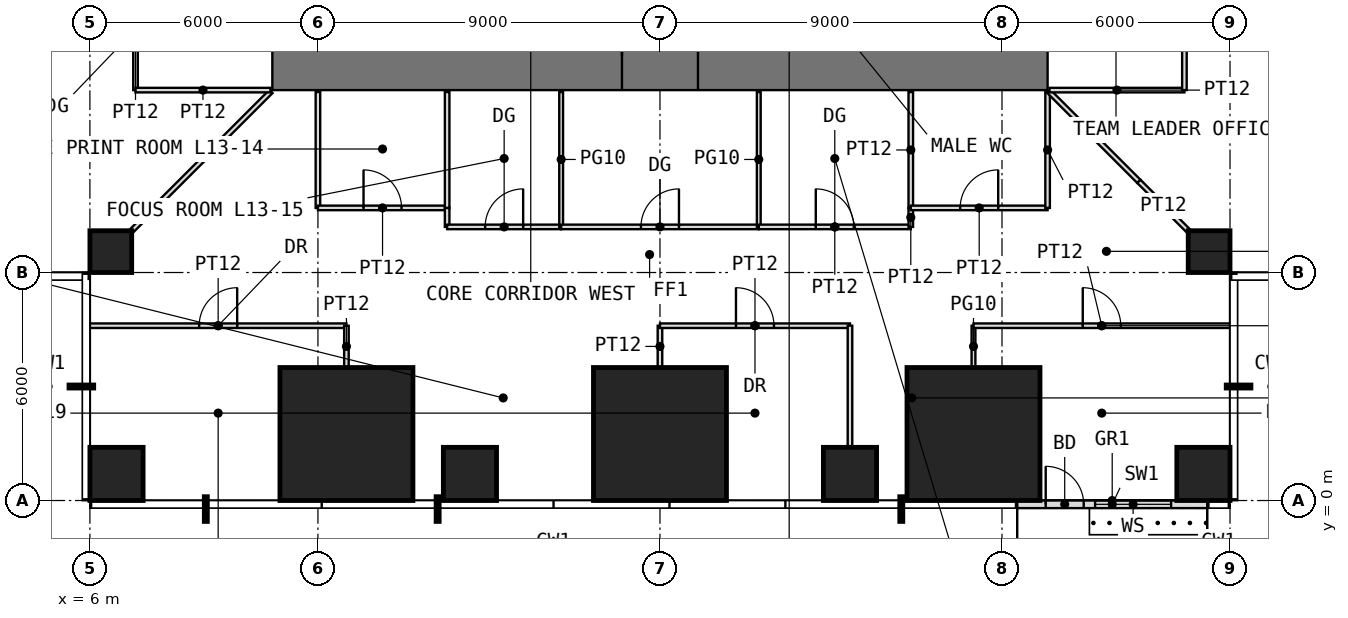
"""IFC4 building model, lengths in metres.
Left out: names, types, materials, properties, quantities, classifications, styles, units other than length and angle.
Written with IfcOpenShell. Run it as: python <this file> out.ifc"""

import sys

from ifc_helpers import new_model, si_unit, direction, frame, frame_2d, origin, origin_2d, place, context, subcontext, project, spatial, rectangle, extrude, element, fill, save


model = new_model("IFC4")
c1 = context("Model", 3, precision=1e-05, world=origin(), true_north=direction((0.0, 1.0)))
c2 = subcontext(c1, "Body", "Model", "MODEL_VIEW")
j1 = project(units=[si_unit("LENGTHUNIT", "METRE"), si_unit("PLANEANGLEUNIT", "RADIAN")], contexts=[c1])
p1 = place(None, origin())
s1 = spatial("IfcSite", under=j1, at=p1, CompositionType="ELEMENT")
p2 = place(p1, origin())
s2 = spatial("IfcBuilding", under=s1, at=p2, CompositionType="ELEMENT")
p3 = place(p2, frame((0.0, 0.0, 58.5)))
s3 = spatial("IfcBuildingStorey", under=s2, at=p3, CompositionType="ELEMENT", Elevation=58.5)
p4 = place(p3, frame((6.7, 0.7, 0.0), z_axis=(0.0, 0.0, 1.0), x_axis=(1.0, 0.0, 0.0)))
e1 = element("IfcColumn", 1, at=p4, inside=s3, PredefinedType="COLUMN", context=c2, shape_type="SweptSolid", body=[
    extrude(rectangle(XDim=1.4, YDim=1.4, at=origin_2d()), origin(), (0.0, 0.0, 1.0), 4.0),
])
p5 = place(p3, frame((12.75, 1.75, 0.0), z_axis=(0.0, 0.0, 1.0), x_axis=(1.0, 0.0, 0.0)))
e2 = element("IfcColumn", 2, at=p5, inside=s3, PredefinedType="COLUMN", context=c2, shape_type="SweptSolid", body=[
    extrude(rectangle(XDim=3.5, YDim=3.5, at=origin_2d()), origin(), (0.0, 0.0, 1.0), 4.0),
])
p6 = place(p3, frame((16.0, 0.7, 0.0), z_axis=(0.0, 0.0, 1.0), x_axis=(1.0, 0.0, 0.0)))
e3 = element("IfcColumn", 3, at=p6, inside=s3, PredefinedType="COLUMN", context=c2, shape_type="SweptSolid", body=[
    extrude(rectangle(XDim=1.4, YDim=1.4, at=origin_2d()), origin(), (0.0, 0.0, 1.0), 4.0),
])
p7 = place(p3, frame((21.0, 1.75, 0.0), z_axis=(0.0, 0.0, 1.0), x_axis=(1.0, 0.0, 0.0)))
e4 = element("IfcColumn", 4, at=p7, inside=s3, PredefinedType="COLUMN", context=c2, shape_type="SweptSolid", body=[
    extrude(rectangle(XDim=3.5, YDim=3.5, at=origin_2d()), origin(), (0.0, 0.0, 1.0), 4.0),
])
p8 = place(p3, frame((26.0, 0.7, 0.0), z_axis=(0.0, 0.0, 1.0), x_axis=(1.0, 0.0, 0.0)))
e5 = element("IfcColumn", 5, at=p8, inside=s3, PredefinedType="COLUMN", context=c2, shape_type="SweptSolid", body=[
    extrude(rectangle(XDim=1.4, YDim=1.4, at=origin_2d()), origin(), (0.0, 0.0, 1.0), 4.0),
])
p9 = place(p3, frame((29.25, 1.75, 0.0), z_axis=(0.0, 0.0, 1.0), x_axis=(1.0, 0.0, 0.0)))
e6 = element("IfcColumn", 6, at=p9, inside=s3, PredefinedType="COLUMN", context=c2, shape_type="SweptSolid", body=[
    extrude(rectangle(XDim=3.5, YDim=3.5, at=origin_2d()), origin(), (0.0, 0.0, 1.0), 4.0),
])
p10 = place(p3, frame((35.3, 0.7, 0.0), z_axis=(0.0, 0.0, 1.0), x_axis=(1.0, 0.0, 0.0)))
e7 = element("IfcColumn", 7, at=p10, inside=s3, PredefinedType="COLUMN", context=c2, shape_type="SweptSolid", body=[
    extrude(rectangle(XDim=1.4, YDim=1.4, at=origin_2d()), origin(), (0.0, 0.0, 1.0), 4.0),
])
for number, where, z_axis, x_axis in (
    (8, (6.55, 6.55, 0.0), (0.0, 0.0, 1.0), (1.0, 0.0, 0.0)),
    (9, (35.45, 6.55, 0.0), (0.0, 0.0, 1.0), (1.0, 0.0, 0.0)),
):
    element("IfcColumn", number, at=place(p3, frame(where, z_axis=z_axis, x_axis=x_axis)), inside=s3, PredefinedType="COLUMN", context=c2, shape_type="SweptSolid", body=[
        extrude(rectangle(XDim=1.1, YDim=1.1, at=origin_2d()), origin(), (0.0, 0.0, 1.0), 4.0),
    ])
p11 = place(p3, frame((30.4, -0.1, 0.0), z_axis=(0.0, 0.0, 1.0), x_axis=(1.0, 0.0, 0.0)))
e10 = element("IfcWall", 10, at=p11, inside=s3, PredefinedType="USERDEFINED", context=c2, shape_type="SweptSolid", body=[
    extrude(rectangle(XDim=5.0, YDim=0.2, at=frame_2d((2.5, 0.0))), origin(), (0.0, 0.0, 1.0), 3.75),
])
p12 = place(p11, frame((0.75, 0.0, 0.0)))
e11 = element("IfcOpeningElement", 11, at=p12, cuts=e10, PredefinedType="OPENING", context=c2, shape_type="SweptSolid", body=[
    extrude(rectangle(XDim=1.0, YDim=2.4, at=frame_2d((0.5, 1.2))), frame((0.0, 0.11, 0.0), z_axis=(0.0, -1.0, 0.0), x_axis=(1.0, 0.0, 0.0)), (0.0, 0.0, 1.0), 0.22),
])
p13 = place(p11, frame((2.05, 0.0, 0.3)))
e12 = element("IfcOpeningElement", 12, at=p13, cuts=e10, PredefinedType="OPENING", context=c2, shape_type="SweptSolid", body=[
    extrude(rectangle(XDim=2.0, YDim=2.7, at=frame_2d((1.0, 1.35))), frame((0.0, 0.11, 0.0), z_axis=(0.0, -1.0, 0.0), x_axis=(1.0, 0.0, 0.0)), (0.0, 0.0, 1.0), 0.22),
])
p14 = place(p3, frame((10.8, 11.7, -0.05), z_axis=(0.0, 0.0, 1.0), x_axis=(1.0, 0.0, 0.0)))
e13 = element("IfcWall", 13, at=p14, inside=s3, PredefinedType="SHEAR", context=c2, shape_type="SweptSolid", body=[
    extrude(rectangle(XDim=20.4, YDim=1.8, at=frame_2d((10.2, 0.0))), origin(), (0.0, 0.0, 1.0), 4.0),
])
p15 = place(p14, frame((9.2, 0.0, 0.05)))
e14 = element("IfcOpeningElement", 14, at=p15, cuts=e13, PredefinedType="OPENING", context=c2, shape_type="SweptSolid", body=[
    extrude(rectangle(XDim=2.0, YDim=2.2, at=frame_2d((1.0, 1.1))), frame((0.0, 0.91, 0.0), z_axis=(0.0, -1.0, 0.0), x_axis=(1.0, 0.0, 0.0)), (0.0, 0.0, 1.0), 1.82),
])
p16 = place(p3, frame((6.0, 4.6, 0.0), z_axis=(0.0, 0.0, 1.0), x_axis=(1.0, 0.0, 0.0)))
e15 = element("IfcWall", 15, at=p16, inside=s3, PredefinedType="PARTITIONING", context=c2, shape_type="SweptSolid", body=[
    extrude(rectangle(XDim=6.75, YDim=0.12, at=frame_2d((3.375, 0.0))), origin(), (0.0, 0.0, 1.0), 3.75),
])
p17 = place(p16, frame((2.875, 0.0, 0.0)))
e16 = element("IfcOpeningElement", 16, at=p17, cuts=e15, PredefinedType="OPENING", context=c2, shape_type="SweptSolid", body=[
    extrude(rectangle(XDim=1.0, YDim=2.2, at=frame_2d((0.5, 1.1))), frame((0.0, 0.07, 0.0), z_axis=(0.0, -1.0, 0.0), x_axis=(1.0, 0.0, 0.0)), (0.0, 0.0, 1.0), 0.14),
])
p18 = place(p3, frame((7.11, 7.11, 0.0), z_axis=(0.0, 0.0, 1.0), x_axis=(0.707106781187, 0.707106781187, 0.0)))
e17 = element("IfcWall", 17, at=p18, inside=s3, PredefinedType="PARTITIONING", context=c2, shape_type="SweptSolid", body=[
    extrude(rectangle(XDim=5.168, YDim=0.12, at=frame_2d((2.584, 0.0))), origin(), (0.0, 0.0, 1.0), 3.75),
])
p19 = place(p3, frame((7.2, 10.8, 0.0), z_axis=(0.0, 0.0, 1.0), x_axis=(0.0, 1.0, 0.0)))
e18 = element("IfcWall", 18, at=p19, inside=s3, PredefinedType="PARTITIONING", context=c2, shape_type="SweptSolid", body=[
    extrude(rectangle(XDim=3.2, YDim=0.12, at=frame_2d((1.6, 0.0))), origin(), (0.0, 0.0, 1.0), 3.75),
])
p20 = place(p19, frame((1.1, 0.0, 0.0)))
e19 = element("IfcOpeningElement", 19, at=p20, cuts=e18, PredefinedType="OPENING", context=c2, shape_type="SweptSolid", body=[
    extrude(rectangle(XDim=1.0, YDim=2.4, at=frame_2d((0.5, 1.2))), frame((0.0, 0.07, 0.0), z_axis=(0.0, -1.0, 0.0), x_axis=(1.0, 0.0, 0.0)), (0.0, 0.0, 1.0), 0.14),
])
p21 = place(p3, frame((7.2, 10.8, 0.0), z_axis=(0.0, 0.0, 1.0), x_axis=(1.0, 0.0, 0.0)))
e20 = element("IfcWall", 20, at=p21, inside=s3, PredefinedType="PARTITIONING", context=c2, shape_type="SweptSolid", body=[
    extrude(rectangle(XDim=3.55, YDim=0.12, at=frame_2d((1.775, 0.0))), origin(), (0.0, 0.0, 1.0), 3.75),
])
p22 = place(p3, frame((12.0, 7.7, 0.0), z_axis=(0.0, 0.0, 1.0), x_axis=(0.0, 1.0, 0.0)))
e21 = element("IfcWall", 21, at=p22, inside=s3, PredefinedType="PARTITIONING", context=c2, shape_type="SweptSolid", body=[
    extrude(rectangle(XDim=3.05, YDim=0.12, at=frame_2d((1.525, 0.0))), origin(), (0.0, 0.0, 1.0), 3.75),
])
p23 = place(p3, frame((12.0, 7.7, 0.0), z_axis=(0.0, 0.0, 1.0), x_axis=(1.0, 0.0, 0.0)))
e22 = element("IfcWall", 22, at=p23, inside=s3, PredefinedType="PARTITIONING", context=c2, shape_type="SweptSolid", body=[
    extrude(rectangle(XDim=3.4, YDim=0.12, at=frame_2d((1.7, 0.0))), origin(), (0.0, 0.0, 1.0), 3.75),
])
p24 = place(p23, frame((1.2, 0.0, 0.0)))
e23 = element("IfcOpeningElement", 23, at=p24, cuts=e22, PredefinedType="OPENING", context=c2, shape_type="SweptSolid", body=[
    extrude(rectangle(XDim=1.0, YDim=2.2, at=frame_2d((0.5, 1.1))), frame((0.0, 0.07, 0.0), z_axis=(0.0, -1.0, 0.0), x_axis=(1.0, 0.0, 0.0)), (0.0, 0.0, 1.0), 0.14),
])
p25 = place(p3, frame((12.75, 3.51, 0.0), z_axis=(0.0, 0.0, 1.0), x_axis=(0.0, 1.0, 0.0)))
e24 = element("IfcWall", 24, at=p25, inside=s3, PredefinedType="PARTITIONING", context=c2, shape_type="SweptSolid", body=[
    extrude(rectangle(XDim=1.09, YDim=0.12, at=frame_2d((0.545, 0.0))), origin(), (0.0, 0.0, 1.0), 3.75),
])
p26 = place(p3, frame((15.4, 7.2, 0.0), z_axis=(0.0, 0.0, 1.0), x_axis=(0.0, 1.0, 0.0)))
e25 = element("IfcWall", 25, at=p26, inside=s3, PredefinedType="PARTITIONING", context=c2, shape_type="SweptSolid", body=[
    extrude(rectangle(XDim=0.5, YDim=0.12, at=frame_2d((0.25, 0.0))), origin(), (0.0, 0.0, 1.0), 3.75),
])
p27 = place(p3, frame((15.4, 7.2, 0.0), z_axis=(0.0, 0.0, 1.0), x_axis=(1.0, 0.0, 0.0)))
e26 = element("IfcWall", 26, at=p27, inside=s3, PredefinedType="PARTITIONING", context=c2, shape_type="SweptSolid", body=[
    extrude(rectangle(XDim=3.0, YDim=0.12, at=frame_2d((1.5, 0.0))), origin(), (0.0, 0.0, 1.0), 3.75),
])
p28 = place(p27, frame((1.0, 0.0, 0.0)))
e27 = element("IfcOpeningElement", 27, at=p28, cuts=e26, PredefinedType="OPENING", context=c2, shape_type="SweptSolid", body=[
    extrude(rectangle(XDim=1.0, YDim=2.4, at=frame_2d((0.5, 1.2))), frame((0.0, 0.07, 0.0), z_axis=(0.0, -1.0, 0.0), x_axis=(1.0, 0.0, 0.0)), (0.0, 0.0, 1.0), 0.14),
])
p29 = place(p3, frame((15.4, 7.7, 0.0), z_axis=(0.0, 0.0, 1.0), x_axis=(0.0, 1.0, 0.0)))
e28 = element("IfcWall", 28, at=p29, inside=s3, PredefinedType="PARTITIONING", context=c2, shape_type="SweptSolid", body=[
    extrude(rectangle(XDim=3.05, YDim=0.12, at=frame_2d((1.525, 0.0))), origin(), (0.0, 0.0, 1.0), 3.75),
])
p30 = place(p3, frame((18.4, 7.2, 0.0), z_axis=(0.0, 0.0, 1.0), x_axis=(0.0, 1.0, 0.0)))
e29 = element("IfcWall", 29, at=p30, inside=s3, PredefinedType="PARTITIONING", context=c2, shape_type="SweptSolid", body=[
    extrude(rectangle(XDim=3.55, YDim=0.1, at=frame_2d((1.775, 0.0))), origin(), (0.0, 0.0, 1.0), 3.75),
])
p31 = place(p3, frame((18.4, 7.2, 0.0), z_axis=(0.0, 0.0, 1.0), x_axis=(1.0, 0.0, 0.0)))
e30 = element("IfcWall", 30, at=p31, inside=s3, PredefinedType="PARTITIONING", context=c2, shape_type="SweptSolid", body=[
    extrude(rectangle(XDim=5.2, YDim=0.12, at=frame_2d((2.6, 0.0))), origin(), (0.0, 0.0, 1.0), 3.75),
])
p32 = place(p31, frame((2.1, 0.0, 0.0)))
e31 = element("IfcOpeningElement", 31, at=p32, cuts=e30, PredefinedType="OPENING", context=c2, shape_type="SweptSolid", body=[
    extrude(rectangle(XDim=1.0, YDim=2.4, at=frame_2d((0.5, 1.2))), frame((0.0, 0.07, 0.0), z_axis=(0.0, -1.0, 0.0), x_axis=(1.0, 0.0, 0.0)), (0.0, 0.0, 1.0), 0.14),
])
p33 = place(p3, frame((21.0, 3.51, 0.0), z_axis=(0.0, 0.0, 1.0), x_axis=(0.0, 1.0, 0.0)))
e32 = element("IfcWall", 32, at=p33, inside=s3, PredefinedType="PARTITIONING", context=c2, shape_type="SweptSolid", body=[
    extrude(rectangle(XDim=1.09, YDim=0.12, at=frame_2d((0.545, 0.0))), origin(), (0.0, 0.0, 1.0), 3.75),
])
p34 = place(p3, frame((21.0, 4.6, 0.0), z_axis=(0.0, 0.0, 1.0), x_axis=(1.0, 0.0, 0.0)))
e33 = element("IfcWall", 33, at=p34, inside=s3, PredefinedType="PARTITIONING", context=c2, shape_type="SweptSolid", body=[
    extrude(rectangle(XDim=5.0, YDim=0.12, at=frame_2d((2.5, 0.0))), origin(), (0.0, 0.0, 1.0), 3.75),
])
p35 = place(p34, frame((2.0, 0.0, 0.0)))
e34 = element("IfcOpeningElement", 34, at=p35, cuts=e33, PredefinedType="OPENING", context=c2, shape_type="SweptSolid", body=[
    extrude(rectangle(XDim=1.0, YDim=2.2, at=frame_2d((0.5, 1.1))), frame((0.0, 0.07, 0.0), z_axis=(0.0, -1.0, 0.0), x_axis=(1.0, 0.0, 0.0)), (0.0, 0.0, 1.0), 0.14),
])
p36 = place(p3, frame((23.6, 7.2, 0.0), z_axis=(0.0, 0.0, 1.0), x_axis=(0.0, 1.0, 0.0)))
e35 = element("IfcWall", 35, at=p36, inside=s3, PredefinedType="PARTITIONING", context=c2, shape_type="SweptSolid", body=[
    extrude(rectangle(XDim=3.55, YDim=0.1, at=frame_2d((1.775, 0.0))), origin(), (0.0, 0.0, 1.0), 3.75),
])
p37 = place(p3, frame((23.6, 7.2, 0.0), z_axis=(0.0, 0.0, 1.0), x_axis=(1.0, 0.0, 0.0)))
e36 = element("IfcWall", 36, at=p37, inside=s3, PredefinedType="PARTITIONING", context=c2, shape_type="SweptSolid", body=[
    extrude(rectangle(XDim=4.0, YDim=0.12, at=frame_2d((2.0, 0.0))), origin(), (0.0, 0.0, 1.0), 3.75),
])
p38 = place(p37, frame((1.5, 0.0, 0.0)))
e37 = element("IfcOpeningElement", 37, at=p38, cuts=e36, PredefinedType="OPENING", context=c2, shape_type="SweptSolid", body=[
    extrude(rectangle(XDim=1.0, YDim=2.4, at=frame_2d((0.5, 1.2))), frame((0.0, 0.07, 0.0), z_axis=(0.0, -1.0, 0.0), x_axis=(1.0, 0.0, 0.0)), (0.0, 0.0, 1.0), 0.14),
])
p39 = place(p3, frame((26.0, 1.41, 0.0), z_axis=(0.0, 0.0, 1.0), x_axis=(0.0, 1.0, 0.0)))
e38 = element("IfcWall", 38, at=p39, inside=s3, PredefinedType="PARTITIONING", context=c2, shape_type="SweptSolid", body=[
    extrude(rectangle(XDim=3.19, YDim=0.12, at=frame_2d((1.595, 0.0))), origin(), (0.0, 0.0, 1.0), 3.75),
])
p40 = place(p3, frame((27.6, 7.2, 0.0), z_axis=(0.0, 0.0, 1.0), x_axis=(0.0, 1.0, 0.0)))
e39 = element("IfcWall", 39, at=p40, inside=s3, PredefinedType="PARTITIONING", context=c2, shape_type="SweptSolid", body=[
    extrude(rectangle(XDim=0.5, YDim=0.12, at=frame_2d((0.25, 0.0))), origin(), (0.0, 0.0, 1.0), 3.75),
])
p41 = place(p3, frame((27.6, 7.7, 0.0), z_axis=(0.0, 0.0, 1.0), x_axis=(0.0, 1.0, 0.0)))
e40 = element("IfcWall", 40, at=p41, inside=s3, PredefinedType="PARTITIONING", context=c2, shape_type="SweptSolid", body=[
    extrude(rectangle(XDim=3.05, YDim=0.12, at=frame_2d((1.525, 0.0))), origin(), (0.0, 0.0, 1.0), 3.75),
])
p42 = place(p3, frame((27.6, 7.7, 0.0), z_axis=(0.0, 0.0, 1.0), x_axis=(1.0, 0.0, 0.0)))
e41 = element("IfcWall", 41, at=p42, inside=s3, PredefinedType="PARTITIONING", context=c2, shape_type="SweptSolid", body=[
    extrude(rectangle(XDim=3.6, YDim=0.12, at=frame_2d((1.8, 0.0))), origin(), (0.0, 0.0, 1.0), 3.75),
])
p43 = place(p42, frame((1.3, 0.0, 0.0)))
e42 = element("IfcOpeningElement", 42, at=p43, cuts=e41, PredefinedType="OPENING", context=c2, shape_type="SweptSolid", body=[
    extrude(rectangle(XDim=1.0, YDim=2.2, at=frame_2d((0.5, 1.1))), frame((0.0, 0.07, 0.0), z_axis=(0.0, -1.0, 0.0), x_axis=(1.0, 0.0, 0.0)), (0.0, 0.0, 1.0), 0.14),
])
p44 = place(p3, frame((29.25, 3.51, 0.0), z_axis=(0.0, 0.0, 1.0), x_axis=(0.0, 1.0, 0.0)))
e43 = element("IfcWall", 43, at=p44, inside=s3, PredefinedType="PARTITIONING", context=c2, shape_type="SweptSolid", body=[
    extrude(rectangle(XDim=1.09, YDim=0.1, at=frame_2d((0.545, 0.0))), origin(), (0.0, 0.0, 1.0), 3.75),
])
p45 = place(p3, frame((29.25, 4.6, 0.0), z_axis=(0.0, 0.0, 1.0), x_axis=(1.0, 0.0, 0.0)))
e44 = element("IfcWall", 44, at=p45, inside=s3, PredefinedType="PARTITIONING", context=c2, shape_type="SweptSolid", body=[
    extrude(rectangle(XDim=6.75, YDim=0.12, at=frame_2d((3.375, 0.0))), origin(), (0.0, 0.0, 1.0), 3.75),
])
p46 = place(p45, frame((2.875, 0.0, 0.0)))
e45 = element("IfcOpeningElement", 45, at=p46, cuts=e44, PredefinedType="OPENING", context=c2, shape_type="SweptSolid", body=[
    extrude(rectangle(XDim=1.0, YDim=2.4, at=frame_2d((0.5, 1.2))), frame((0.0, 0.07, 0.0), z_axis=(0.0, -1.0, 0.0), x_axis=(1.0, 0.0, 0.0)), (0.0, 0.0, 1.0), 0.14),
])
p47 = place(p3, frame((31.2, 7.7, 0.0), z_axis=(0.0, 0.0, 1.0), x_axis=(0.0, 1.0, 0.0)))
e46 = element("IfcWall", 46, at=p47, inside=s3, PredefinedType="PARTITIONING", context=c2, shape_type="SweptSolid", body=[
    extrude(rectangle(XDim=3.05, YDim=0.12, at=frame_2d((1.525, 0.0))), origin(), (0.0, 0.0, 1.0), 3.75),
])
p48 = place(p3, frame((31.235, 10.765, 0.0), z_axis=(0.0, 0.0, 1.0), x_axis=(0.707106781187, -0.707106781187, 0.0)))
e47 = element("IfcWall", 47, at=p48, inside=s3, PredefinedType="PARTITIONING", context=c2, shape_type="SweptSolid", body=[
    extrude(rectangle(XDim=3.346, YDim=0.12, at=frame_2d((1.673, 0.0))), origin(), (0.0, 0.0, 1.0), 3.75),
])
p49 = place(p3, frame((31.25, 10.8, 0.0), z_axis=(0.0, 0.0, 1.0), x_axis=(1.0, 0.0, 0.0)))
e48 = element("IfcWall", 48, at=p49, inside=s3, PredefinedType="PARTITIONING", context=c2, shape_type="SweptSolid", body=[
    extrude(rectangle(XDim=3.55, YDim=0.12, at=frame_2d((1.775, 0.0))), origin(), (0.0, 0.0, 1.0), 3.75),
])
p50 = place(p3, frame((33.602, 8.398, 0.0), z_axis=(0.0, 0.0, 1.0), x_axis=(0.707106781187, -0.707106781187, 0.0)))
e49 = element("IfcWall", 49, at=p50, inside=s3, PredefinedType="PARTITIONING", context=c2, shape_type="SweptSolid", body=[
    extrude(rectangle(XDim=1.822, YDim=0.12, at=frame_2d((0.911, 0.0))), origin(), (0.0, 0.0, 1.0), 3.75),
])
p51 = place(p3, frame((34.8, 10.8, 0.0), z_axis=(0.0, 0.0, 1.0), x_axis=(0.0, 1.0, 0.0)))
e50 = element("IfcWall", 50, at=p51, inside=s3, PredefinedType="PARTITIONING", context=c2, shape_type="SweptSolid", body=[
    extrude(rectangle(XDim=3.3, YDim=0.12, at=frame_2d((1.65, 0.0))), origin(), (0.0, 0.0, 1.0), 3.75),
])
p52 = place(p51, frame((1.15, 0.0, 0.0)))
e51 = element("IfcOpeningElement", 51, at=p52, cuts=e50, PredefinedType="OPENING", context=c2, shape_type="SweptSolid", body=[
    extrude(rectangle(XDim=1.0, YDim=2.2, at=frame_2d((0.5, 1.1))), frame((0.0, 0.07, 0.0), z_axis=(0.0, -1.0, 0.0), x_axis=(1.0, 0.0, 0.0)), (0.0, 0.0, 1.0), 0.14),
])
p53 = place(p12, origin())
e52 = element("IfcDoor", 52, at=p53, inside=s3, OperationType="SINGLE_SWING_LEFT", PredefinedType="DOOR", context=c2, shape_type="SweptSolid", body=[
    extrude(rectangle(XDim=1.0, YDim=2.4, at=frame_2d((0.5, 1.2))), frame((0.0, 0.025, 0.0), z_axis=(0.0, -1.0, 0.0), x_axis=(1.0, 0.0, 0.0)), (0.0, 0.0, 1.0), 0.05),
])
fill(e11, e52)
p54 = place(p13, origin())
e53 = element("IfcWindow", 53, at=p54, inside=s3, PartitioningType="SINGLE_PANEL", PredefinedType="WINDOW", context=c2, shape_type="SweptSolid", body=[
    extrude(rectangle(XDim=2.0, YDim=2.7, at=frame_2d((1.0, 1.35))), frame((0.0, 0.03, 0.0), z_axis=(0.0, -1.0, 0.0), x_axis=(1.0, 0.0, 0.0)), (0.0, 0.0, 1.0), 0.06),
])
fill(e12, e53)
p55 = place(p15, origin())
e54 = element("IfcDoor", 54, at=p55, inside=s3, OperationType="DOUBLE_DOOR_SINGLE_SWING", PredefinedType="DOOR", context=c2, shape_type="SweptSolid", body=[
    extrude(rectangle(XDim=2.0, YDim=2.2, at=frame_2d((1.0, 1.1))), frame((0.0, 0.025, 0.0), z_axis=(0.0, -1.0, 0.0), x_axis=(1.0, 0.0, 0.0)), (0.0, 0.0, 1.0), 0.05),
])
fill(e14, e54)
p56 = place(p24, origin())
e55 = element("IfcDoor", 55, at=p56, inside=s3, OperationType="SINGLE_SWING_LEFT", PredefinedType="DOOR", context=c2, shape_type="SweptSolid", body=[
    extrude(rectangle(XDim=1.0, YDim=2.2, at=frame_2d((0.5, 1.1))), frame((0.0, 0.025, 0.0), z_axis=(0.0, -1.0, 0.0), x_axis=(1.0, 0.0, 0.0)), (0.0, 0.0, 1.0), 0.05),
])
fill(e23, e55)
p57 = place(p28, origin())
e56 = element("IfcDoor", 56, at=p57, inside=s3, OperationType="SINGLE_SWING_RIGHT", PredefinedType="DOOR", context=c2, shape_type="SweptSolid", body=[
    extrude(rectangle(XDim=1.0, YDim=2.4, at=frame_2d((0.5, 1.2))), frame((0.0, 0.025, 0.0), z_axis=(0.0, -1.0, 0.0), x_axis=(1.0, 0.0, 0.0)), (0.0, 0.0, 1.0), 0.05),
])
fill(e27, e56)
p58 = place(p38, origin())
e57 = element("IfcDoor", 57, at=p58, inside=s3, OperationType="SINGLE_SWING_LEFT", PredefinedType="DOOR", context=c2, shape_type="SweptSolid", body=[
    extrude(rectangle(XDim=1.0, YDim=2.4, at=frame_2d((0.5, 1.2))), frame((0.0, 0.025, 0.0), z_axis=(0.0, -1.0, 0.0), x_axis=(1.0, 0.0, 0.0)), (0.0, 0.0, 1.0), 0.05),
])
fill(e37, e57)
p59 = place(p43, origin())
e58 = element("IfcDoor", 58, at=p59, inside=s3, OperationType="SINGLE_SWING_RIGHT", PredefinedType="DOOR", context=c2, shape_type="SweptSolid", body=[
    extrude(rectangle(XDim=1.0, YDim=2.2, at=frame_2d((0.5, 1.1))), frame((0.0, 0.025, 0.0), z_axis=(0.0, -1.0, 0.0), x_axis=(1.0, 0.0, 0.0)), (0.0, 0.0, 1.0), 0.05),
])
fill(e42, e58)
p60 = place(p17, origin())
e59 = element("IfcDoor", 59, at=p60, inside=s3, OperationType="SINGLE_SWING_RIGHT", PredefinedType="DOOR", context=c2, shape_type="SweptSolid", body=[
    extrude(rectangle(XDim=1.0, YDim=2.2, at=frame_2d((0.5, 1.1))), frame((0.0, 0.025, 0.0), z_axis=(0.0, -1.0, 0.0), x_axis=(1.0, 0.0, 0.0)), (0.0, 0.0, 1.0), 0.05),
])
fill(e16, e59)
p61 = place(p35, origin())
e60 = element("IfcDoor", 60, at=p61, inside=s3, OperationType="SINGLE_SWING_LEFT", PredefinedType="DOOR", context=c2, shape_type="SweptSolid", body=[
    extrude(rectangle(XDim=1.0, YDim=2.2, at=frame_2d((0.5, 1.1))), frame((0.0, 0.025, 0.0), z_axis=(0.0, -1.0, 0.0), x_axis=(1.0, 0.0, 0.0)), (0.0, 0.0, 1.0), 0.05),
])
fill(e34, e60)
p62 = place(p46, origin())
e61 = element("IfcDoor", 61, at=p62, inside=s3, OperationType="SINGLE_SWING_LEFT", PredefinedType="DOOR", context=c2, shape_type="SweptSolid", body=[
    extrude(rectangle(XDim=1.0, YDim=2.4, at=frame_2d((0.5, 1.2))), frame((0.0, 0.025, 0.0), z_axis=(0.0, -1.0, 0.0), x_axis=(1.0, 0.0, 0.0)), (0.0, 0.0, 1.0), 0.05),
])
fill(e45, e61)
p63 = place(p32, origin())
e62 = element("IfcDoor", 62, at=p63, inside=s3, OperationType="SINGLE_SWING_RIGHT", PredefinedType="DOOR", context=c2, shape_type="SweptSolid", body=[
    extrude(rectangle(XDim=1.0, YDim=2.4, at=frame_2d((0.5, 1.2))), frame((0.0, 0.025, 0.0), z_axis=(0.0, -1.0, 0.0), x_axis=(1.0, 0.0, 0.0)), (0.0, 0.0, 1.0), 0.05),
])
fill(e31, e62)
save(model, sys.argv[1])
